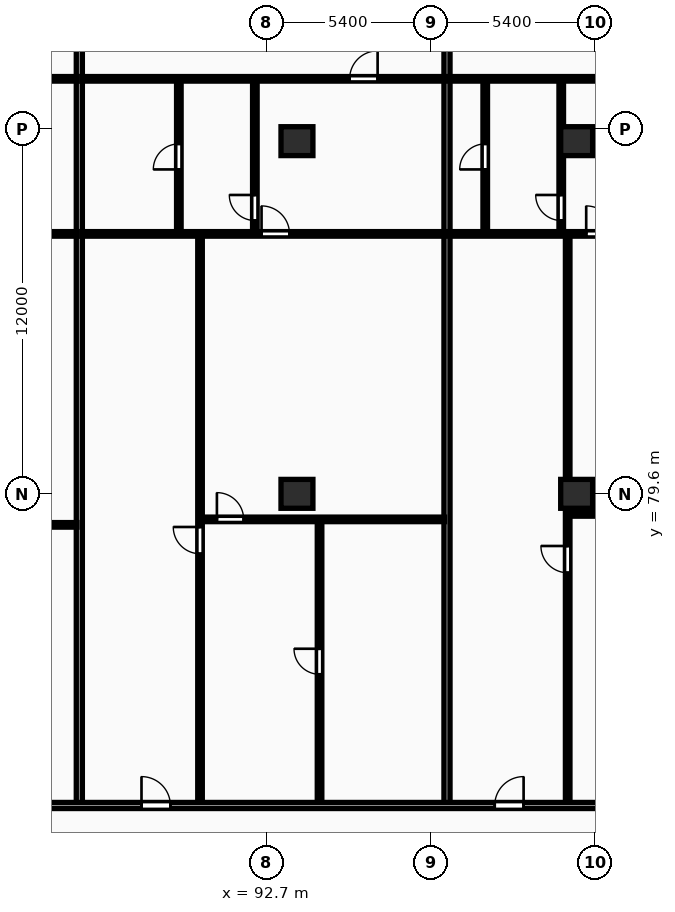
"""IFC4 building model, lengths in metres.
Left out: names, types, materials, properties, quantities, classifications, styles, units other than length and angle.
Written with IfcOpenShell. Run it as: python <this file> out.ifc"""

import sys

from ifc_helpers import new_model, si_unit, direction, frame, frame_2d, origin, origin_2d, place, context, subcontext, project, spatial, rectangle, extrude, element, fill, save


model = new_model("IFC4")
c1 = context("Model", 3, precision=1e-05, world=origin(), true_north=direction((0.0, 1.0)))
c2 = subcontext(c1, "Body", "Model", "MODEL_VIEW")
j1 = project(units=[si_unit("LENGTHUNIT", "METRE"), si_unit("PLANEANGLEUNIT", "RADIAN")], contexts=[c1])
p1 = place(None, origin())
s1 = spatial("IfcSite", under=j1, at=p1, CompositionType="ELEMENT")
p2 = place(p1, origin())
s2 = spatial("IfcBuilding", under=s1, at=p2, CompositionType="ELEMENT")
p3 = place(p2, frame((0.0, 0.0, 24.0)))
s3 = spatial("IfcBuildingStorey", under=s2, at=p3, CompositionType="ELEMENT", Elevation=24.0)
for number, where, z_axis, x_axis in (
    (1, (93.7, 79.6, 0.0), (0.0, 0.0, 1.0), (1.0, 0.0, 0.0)),
    (2, (93.7, 91.2, 0.0), (0.0, 0.0, 1.0), (1.0, 0.0, 0.0)),
    (3, (102.9, 79.6, 0.0), (0.0, 0.0, 1.0), (1.0, 0.0, 0.0)),
    (4, (102.9, 91.2, 0.0), (0.0, 0.0, 1.0), (1.0, 0.0, 0.0)),
):
    element("IfcColumn", number, at=place(p3, frame(where, z_axis=z_axis, x_axis=x_axis)), inside=s3, PredefinedType="COLUMN", context=c2, shape_type="SweptSolid", body=[
        extrude(rectangle(XDim=1.05, YDim=0.95, at=origin_2d()), origin(), (0.0, 0.0, 1.0), 3.25),
    ])
p4 = place(p3, frame((86.542, 69.43, 0.0), z_axis=(0.0, 0.0, 1.0), x_axis=(0.0, 1.0, 0.0)))
e5 = element("IfcWall", 5, at=p4, inside=s3, PredefinedType="PARTITIONING", context=c2, shape_type="SweptSolid", body=[
    extrude(rectangle(XDim=29.07, YDim=0.2, at=frame_2d((14.535, 0.0))), origin(), (0.0, 0.0, 1.0), 2.97),
])
p5 = place(p3, frame((80.494, 78.58, 0.0), z_axis=(0.0, 0.0, 1.0), x_axis=(1.0, 0.0, 0.0)))
e6 = element("IfcWall", 6, at=p5, inside=s3, PredefinedType="PARTITIONING", context=c2, shape_type="SweptSolid", body=[
    extrude(rectangle(XDim=5.968, YDim=0.15, at=frame_2d((2.984, 0.0))), origin(), (0.0, 0.0, 1.0), 2.97),
])
p6 = place(p5, frame((1.403, 0.0, 0.0)))
e7 = element("IfcOpeningElement", 7, at=p6, cuts=e6, PredefinedType="OPENING", context=c2, shape_type="SweptSolid", body=[
    extrude(rectangle(XDim=0.88, YDim=2.06, at=frame_2d((0.44, 1.03))), frame((0.0, 0.085, 0.0), z_axis=(0.0, -1.0, 0.0), x_axis=(1.0, 0.0, 0.0)), (0.0, 0.0, 1.0), 0.17),
])
p7 = place(p3, frame((76.544, 88.15, 0.0), z_axis=(0.0, 0.0, 1.0), x_axis=(1.0, 0.0, 0.0)))
e8 = element("IfcWall", 8, at=p7, inside=s3, PredefinedType="PARTITIONING", context=c2, shape_type="SweptSolid", body=[
    extrude(rectangle(XDim=9.918, YDim=0.15, at=frame_2d((4.959, 0.0))), origin(), (0.0, 0.0, 1.0), 2.97),
])
p8 = place(p7, frame((4.499, 0.0, 0.0)))
e9 = element("IfcOpeningElement", 9, at=p8, cuts=e8, PredefinedType="OPENING", context=c2, shape_type="SweptSolid", body=[
    extrude(rectangle(XDim=0.92, YDim=2.08, at=frame_2d((0.46, 1.04))), frame((0.0, 0.085, 0.0), z_axis=(0.0, -1.0, 0.0), x_axis=(1.0, 0.0, 0.0)), (0.0, 0.0, 1.0), 0.17),
])
p9 = place(p3, frame((76.544, 93.25, 0.0), z_axis=(0.0, 0.0, 1.0), x_axis=(1.0, 0.0, 0.0)))
e10 = element("IfcWall", 10, at=p9, inside=s3, PredefinedType="PARTITIONING", context=c2, shape_type="SweptSolid", body=[
    extrude(rectangle(XDim=9.918, YDim=0.15, at=frame_2d((4.959, 0.0))), origin(), (0.0, 0.0, 1.0), 2.97),
])
p10 = place(p9, frame((4.499, 0.0, 0.0)))
e11 = element("IfcOpeningElement", 11, at=p10, cuts=e10, PredefinedType="OPENING", context=c2, shape_type="SweptSolid", body=[
    extrude(rectangle(XDim=0.92, YDim=2.08, at=frame_2d((0.46, 1.04))), frame((0.0, 0.085, 0.0), z_axis=(0.0, -1.0, 0.0), x_axis=(1.0, 0.0, 0.0)), (0.0, 0.0, 1.0), 0.17),
])
p11 = place(p3, frame((98.635, 69.43, 0.0), z_axis=(0.0, 0.0, 1.0), x_axis=(0.0, 1.0, 0.0)))
e12 = element("IfcWall", 12, at=p11, inside=s3, PredefinedType="PARTITIONING", context=c2, shape_type="SweptSolid", body=[
    extrude(rectangle(XDim=29.07, YDim=0.2, at=frame_2d((14.535, 0.0))), origin(), (0.0, 0.0, 1.0), 2.97),
])
p12 = place(p3, frame((94.443, 69.41, 0.0), z_axis=(0.0, 0.0, 1.0), x_axis=(0.0, 1.0, 0.0)))
e13 = element("IfcWall", 13, at=p12, inside=s3, PredefinedType="PARTITIONING", context=c2, shape_type="SweptSolid", body=[
    extrude(rectangle(XDim=9.35, YDim=0.15, at=frame_2d((4.675, 0.0))), origin(), (0.0, 0.0, 1.0), 2.97),
])
p13 = place(p12, frame((4.255, 0.0, 0.0)))
e14 = element("IfcOpeningElement", 14, at=p13, cuts=e13, PredefinedType="OPENING", context=c2, shape_type="SweptSolid", body=[
    extrude(rectangle(XDim=0.84, YDim=2.04, at=frame_2d((0.42, 1.02))), frame((0.0, 0.085, 0.0), z_axis=(0.0, -1.0, 0.0), x_axis=(1.0, 0.0, 0.0)), (0.0, 0.0, 1.0), 0.17),
])
p14 = place(p3, frame((90.572, 78.76, 0.0), z_axis=(0.0, 0.0, 1.0), x_axis=(1.0, 0.0, 0.0)))
e15 = element("IfcWall", 15, at=p14, inside=s3, PredefinedType="PARTITIONING", context=c2, shape_type="SweptSolid", body=[
    extrude(rectangle(XDim=7.983, YDim=0.15, at=frame_2d((3.992, 0.0))), origin(), (0.0, 0.0, 1.0), 2.97),
])
p15 = place(p14, frame((0.495, 0.0, 0.0)))
e16 = element("IfcOpeningElement", 16, at=p15, cuts=e15, PredefinedType="OPENING", context=c2, shape_type="SweptSolid", body=[
    extrude(rectangle(XDim=0.88, YDim=2.06, at=frame_2d((0.44, 1.03))), frame((0.0, 0.085, 0.0), z_axis=(0.0, -1.0, 0.0), x_axis=(1.0, 0.0, 0.0)), (0.0, 0.0, 1.0), 0.17),
])
p16 = place(p3, frame((90.511, 69.41, 0.0), z_axis=(0.0, 0.0, 1.0), x_axis=(0.0, 1.0, 0.0)))
e17 = element("IfcWall", 17, at=p16, inside=s3, PredefinedType="PARTITIONING", context=c2, shape_type="SweptSolid", body=[
    extrude(rectangle(XDim=18.7, YDim=0.15, at=frame_2d((9.35, 0.0))), origin(), (0.0, 0.0, 1.0), 2.97),
])
p17 = place(p16, frame((8.22, 0.0, 0.0)))
e18 = element("IfcOpeningElement", 18, at=p17, cuts=e17, PredefinedType="OPENING", context=c2, shape_type="SweptSolid", body=[
    extrude(rectangle(XDim=0.88, YDim=2.06, at=frame_2d((0.44, 1.03))), frame((0.0, 0.085, 0.0), z_axis=(0.0, -1.0, 0.0), x_axis=(1.0, 0.0, 0.0)), (0.0, 0.0, 1.0), 0.17),
])
p18 = place(p3, frame((89.815, 88.19, 0.0), z_axis=(0.0, 0.0, 1.0), x_axis=(0.0, 1.0, 0.0)))
e19 = element("IfcWall", 19, at=p18, inside=s3, PredefinedType="PARTITIONING", context=c2, shape_type="SweptSolid", body=[
    extrude(rectangle(XDim=5.0, YDim=0.15, at=frame_2d((2.5, 0.0))), origin(), (0.0, 0.0, 1.0), 2.97),
])
p19 = place(p18, frame((2.08, 0.0, 0.0)))
e20 = element("IfcOpeningElement", 20, at=p19, cuts=e19, PredefinedType="OPENING", context=c2, shape_type="SweptSolid", body=[
    extrude(rectangle(XDim=0.84, YDim=2.04, at=frame_2d((0.42, 1.02))), frame((0.0, 0.085, 0.0), z_axis=(0.0, -1.0, 0.0), x_axis=(1.0, 0.0, 0.0)), (0.0, 0.0, 1.0), 0.17),
])
p20 = place(p3, frame((92.315, 88.19, 0.0), z_axis=(0.0, 0.0, 1.0), x_axis=(0.0, 1.0, 0.0)))
e21 = element("IfcWall", 21, at=p20, inside=s3, PredefinedType="PARTITIONING", context=c2, shape_type="SweptSolid", body=[
    extrude(rectangle(XDim=5.0, YDim=0.15, at=frame_2d((2.5, 0.0))), origin(), (0.0, 0.0, 1.0), 2.97),
])
p21 = place(p20, frame((0.4, 0.0, 0.0)))
e22 = element("IfcOpeningElement", 22, at=p21, cuts=e21, PredefinedType="OPENING", context=c2, shape_type="SweptSolid", body=[
    extrude(rectangle(XDim=0.84, YDim=2.04, at=frame_2d((0.42, 1.02))), frame((0.0, 0.085, 0.0), z_axis=(0.0, -1.0, 0.0), x_axis=(1.0, 0.0, 0.0)), (0.0, 0.0, 1.0), 0.17),
])
p22 = place(p3, frame((86.622, 88.15, 0.0), z_axis=(0.0, 0.0, 1.0), x_axis=(1.0, 0.0, 0.0)))
e23 = element("IfcWall", 23, at=p22, inside=s3, PredefinedType="PARTITIONING", context=c2, shape_type="SweptSolid", body=[
    extrude(rectangle(XDim=11.933, YDim=0.15, at=frame_2d((5.967, 0.0))), origin(), (0.0, 0.0, 1.0), 2.97),
])
p23 = place(p22, frame((5.914, 0.0, 0.0)))
e24 = element("IfcOpeningElement", 24, at=p23, cuts=e23, PredefinedType="OPENING", context=c2, shape_type="SweptSolid", body=[
    extrude(rectangle(XDim=0.92, YDim=2.08, at=frame_2d((0.46, 1.04))), frame((0.0, 0.085, 0.0), z_axis=(0.0, -1.0, 0.0), x_axis=(1.0, 0.0, 0.0)), (0.0, 0.0, 1.0), 0.17),
])
p24 = place(p3, frame((86.622, 93.25, 0.0), z_axis=(0.0, 0.0, 1.0), x_axis=(1.0, 0.0, 0.0)))
e25 = element("IfcWall", 25, at=p24, inside=s3, PredefinedType="PARTITIONING", context=c2, shape_type="SweptSolid", body=[
    extrude(rectangle(XDim=11.933, YDim=0.15, at=frame_2d((5.967, 0.0))), origin(), (0.0, 0.0, 1.0), 2.97),
])
p25 = place(p24, frame((8.812, 0.0, 0.0)))
e26 = element("IfcOpeningElement", 26, at=p25, cuts=e25, PredefinedType="OPENING", context=c2, shape_type="SweptSolid", body=[
    extrude(rectangle(XDim=0.92, YDim=2.08, at=frame_2d((0.46, 1.04))), frame((0.0, 0.085, 0.0), z_axis=(0.0, -1.0, 0.0), x_axis=(1.0, 0.0, 0.0)), (0.0, 0.0, 1.0), 0.17),
])
p26 = place(p3, frame((102.665, 78.94, 0.0), z_axis=(0.0, 0.0, 1.0), x_axis=(1.0, 0.0, 0.0)))
e27 = element("IfcWall", 27, at=p26, inside=s3, PredefinedType="PARTITIONING", context=c2, shape_type="SweptSolid", body=[
    extrude(rectangle(XDim=5.968, YDim=0.15, at=frame_2d((2.984, 0.0))), origin(), (0.0, 0.0, 1.0), 2.97),
])
p27 = place(p26, frame((2.544, 0.0, 0.0)))
e28 = element("IfcOpeningElement", 28, at=p27, cuts=e27, PredefinedType="OPENING", context=c2, shape_type="SweptSolid", body=[
    extrude(rectangle(XDim=0.88, YDim=2.06, at=frame_2d((0.44, 1.03))), frame((0.0, 0.085, 0.0), z_axis=(0.0, -1.0, 0.0), x_axis=(1.0, 0.0, 0.0)), (0.0, 0.0, 1.0), 0.17),
])
p28 = place(p3, frame((102.605, 69.41, 0.0), z_axis=(0.0, 0.0, 1.0), x_axis=(0.0, 1.0, 0.0)))
e29 = element("IfcWall", 29, at=p28, inside=s3, PredefinedType="PARTITIONING", context=c2, shape_type="SweptSolid", body=[
    extrude(rectangle(XDim=18.7, YDim=0.15, at=frame_2d((9.35, 0.0))), origin(), (0.0, 0.0, 1.0), 2.22),
])
p29 = place(p28, frame((7.595, 0.0, 0.0)))
e30 = element("IfcOpeningElement", 30, at=p29, cuts=e29, PredefinedType="OPENING", context=c2, shape_type="SweptSolid", body=[
    extrude(rectangle(XDim=0.88, YDim=2.06, at=frame_2d((0.44, 1.03))), frame((0.0, 0.085, 0.0), z_axis=(0.0, -1.0, 0.0), x_axis=(1.0, 0.0, 0.0)), (0.0, 0.0, 1.0), 0.17),
])
p30 = place(p3, frame((99.893, 88.19, 0.0), z_axis=(0.0, 0.0, 1.0), x_axis=(0.0, 1.0, 0.0)))
e31 = element("IfcWall", 31, at=p30, inside=s3, PredefinedType="PARTITIONING", context=c2, shape_type="SweptSolid", body=[
    extrude(rectangle(XDim=5.0, YDim=0.15, at=frame_2d((2.5, 0.0))), origin(), (0.0, 0.0, 1.0), 2.97),
])
p31 = place(p30, frame((2.08, 0.0, 0.0)))
e32 = element("IfcOpeningElement", 32, at=p31, cuts=e31, PredefinedType="OPENING", context=c2, shape_type="SweptSolid", body=[
    extrude(rectangle(XDim=0.84, YDim=2.04, at=frame_2d((0.42, 1.02))), frame((0.0, 0.085, 0.0), z_axis=(0.0, -1.0, 0.0), x_axis=(1.0, 0.0, 0.0)), (0.0, 0.0, 1.0), 0.17),
])
p32 = place(p3, frame((102.393, 88.19, 0.0), z_axis=(0.0, 0.0, 1.0), x_axis=(0.0, 1.0, 0.0)))
e33 = element("IfcWall", 33, at=p32, inside=s3, PredefinedType="PARTITIONING", context=c2, shape_type="SweptSolid", body=[
    extrude(rectangle(XDim=5.0, YDim=0.15, at=frame_2d((2.5, 0.0))), origin(), (0.0, 0.0, 1.0), 2.97),
])
p33 = place(p32, frame((0.4, 0.0, 0.0)))
e34 = element("IfcOpeningElement", 34, at=p33, cuts=e33, PredefinedType="OPENING", context=c2, shape_type="SweptSolid", body=[
    extrude(rectangle(XDim=0.84, YDim=2.04, at=frame_2d((0.42, 1.02))), frame((0.0, 0.085, 0.0), z_axis=(0.0, -1.0, 0.0), x_axis=(1.0, 0.0, 0.0)), (0.0, 0.0, 1.0), 0.17),
])
p34 = place(p3, frame((98.715, 88.15, 0.0), z_axis=(0.0, 0.0, 1.0), x_axis=(1.0, 0.0, 0.0)))
e35 = element("IfcWall", 35, at=p34, inside=s3, PredefinedType="PARTITIONING", context=c2, shape_type="SweptSolid", body=[
    extrude(rectangle(XDim=9.918, YDim=0.15, at=frame_2d((4.959, 0.0))), origin(), (0.0, 0.0, 1.0), 2.97),
])
p35 = place(p34, frame((4.499, 0.0, 0.0)))
e36 = element("IfcOpeningElement", 36, at=p35, cuts=e35, PredefinedType="OPENING", context=c2, shape_type="SweptSolid", body=[
    extrude(rectangle(XDim=0.92, YDim=2.08, at=frame_2d((0.46, 1.04))), frame((0.0, 0.085, 0.0), z_axis=(0.0, -1.0, 0.0), x_axis=(1.0, 0.0, 0.0)), (0.0, 0.0, 1.0), 0.17),
])
p36 = place(p3, frame((98.715, 93.25, 0.0), z_axis=(0.0, 0.0, 1.0), x_axis=(1.0, 0.0, 0.0)))
e37 = element("IfcWall", 37, at=p36, inside=s3, PredefinedType="PARTITIONING", context=c2, shape_type="SweptSolid", body=[
    extrude(rectangle(XDim=9.918, YDim=0.15, at=frame_2d((4.959, 0.0))), origin(), (0.0, 0.0, 1.0), 2.97),
])
p37 = place(p36, frame((5.936, 0.0, 0.0)))
e38 = element("IfcOpeningElement", 38, at=p37, cuts=e37, PredefinedType="OPENING", context=c2, shape_type="SweptSolid", body=[
    extrude(rectangle(XDim=0.92, YDim=2.08, at=frame_2d((0.46, 1.04))), frame((0.0, 0.085, 0.0), z_axis=(0.0, -1.0, 0.0), x_axis=(1.0, 0.0, 0.0)), (0.0, 0.0, 1.0), 0.17),
])
p38 = place(p3, frame((55.3, 69.35, 0.0), z_axis=(0.0, 0.0, 1.0), x_axis=(1.0, 0.0, 0.0)))
e39 = element("IfcWall", 39, at=p38, inside=s3, PredefinedType="PARTITIONING", context=c2, shape_type="SweptSolid", body=[
    extrude(rectangle(XDim=77.6, YDim=0.2, at=frame_2d((38.8, 0.0))), origin(), (0.0, 0.0, 1.0), 2.97),
])
p39 = place(p38, frame((1.81, 0.0, 0.0)))
e40 = element("IfcOpeningElement", 40, at=p39, cuts=e39, PredefinedType="OPENING", context=c2, shape_type="SweptSolid", body=[
    extrude(rectangle(XDim=0.95, YDim=2.15, at=frame_2d((0.475, 1.075))), frame((0.0, 0.11, 0.0), z_axis=(0.0, -1.0, 0.0), x_axis=(1.0, 0.0, 0.0)), (0.0, 0.0, 1.0), 0.22),
])
p40 = place(p38, frame((10.448, 0.0, 0.0)))
e41 = element("IfcOpeningElement", 41, at=p40, cuts=e39, PredefinedType="OPENING", context=c2, shape_type="SweptSolid", body=[
    extrude(rectangle(XDim=0.95, YDim=2.15, at=frame_2d((0.475, 1.075))), frame((0.0, 0.11, 0.0), z_axis=(0.0, -1.0, 0.0), x_axis=(1.0, 0.0, 0.0)), (0.0, 0.0, 1.0), 0.22),
])
p41 = place(p38, frame((23.208, 0.0, 0.0)))
e42 = element("IfcOpeningElement", 42, at=p41, cuts=e39, PredefinedType="OPENING", context=c2, shape_type="SweptSolid", body=[
    extrude(rectangle(XDim=0.95, YDim=2.15, at=frame_2d((0.475, 1.075))), frame((0.0, 0.11, 0.0), z_axis=(0.0, -1.0, 0.0), x_axis=(1.0, 0.0, 0.0)), (0.0, 0.0, 1.0), 0.22),
])
p42 = place(p38, frame((33.287, 0.0, 0.0)))
e43 = element("IfcOpeningElement", 43, at=p42, cuts=e39, PredefinedType="OPENING", context=c2, shape_type="SweptSolid", body=[
    extrude(rectangle(XDim=0.95, YDim=2.15, at=frame_2d((0.475, 1.075))), frame((0.0, 0.11, 0.0), z_axis=(0.0, -1.0, 0.0), x_axis=(1.0, 0.0, 0.0)), (0.0, 0.0, 1.0), 0.22),
])
p43 = place(p38, frame((44.905, 0.0, 0.0)))
e44 = element("IfcOpeningElement", 44, at=p43, cuts=e39, PredefinedType="OPENING", context=c2, shape_type="SweptSolid", body=[
    extrude(rectangle(XDim=0.95, YDim=2.15, at=frame_2d((0.475, 1.075))), frame((0.0, 0.11, 0.0), z_axis=(0.0, -1.0, 0.0), x_axis=(1.0, 0.0, 0.0)), (0.0, 0.0, 1.0), 0.22),
])
p44 = place(p38, frame((54.119, 0.0, 0.0)))
e45 = element("IfcOpeningElement", 45, at=p44, cuts=e39, PredefinedType="OPENING", context=c2, shape_type="SweptSolid", body=[
    extrude(rectangle(XDim=0.95, YDim=2.15, at=frame_2d((0.475, 1.075))), frame((0.0, 0.11, 0.0), z_axis=(0.0, -1.0, 0.0), x_axis=(1.0, 0.0, 0.0)), (0.0, 0.0, 1.0), 0.22),
])
p45 = place(p38, frame((66.74, 0.0, 0.0)))
e46 = element("IfcOpeningElement", 46, at=p45, cuts=e39, PredefinedType="OPENING", context=c2, shape_type="SweptSolid", body=[
    extrude(rectangle(XDim=0.95, YDim=2.15, at=frame_2d((0.475, 1.075))), frame((0.0, 0.11, 0.0), z_axis=(0.0, -1.0, 0.0), x_axis=(1.0, 0.0, 0.0)), (0.0, 0.0, 1.0), 0.22),
])
p46 = place(p13, origin())
e47 = element("IfcDoor", 47, at=p46, inside=s3, OperationType="SINGLE_SWING_RIGHT", PredefinedType="DOOR", context=c2, shape_type="SweptSolid", body=[
    extrude(rectangle(XDim=0.84, YDim=2.04, at=frame_2d((0.42, 1.02))), frame((0.0, 0.025, 0.0), z_axis=(0.0, -1.0, 0.0), x_axis=(1.0, 0.0, 0.0)), (0.0, 0.0, 1.0), 0.05),
])
fill(e14, e47)
p47 = place(p15, origin())
e48 = element("IfcDoor", 48, at=p47, inside=s3, OperationType="SINGLE_SWING_LEFT", PredefinedType="DOOR", context=c2, shape_type="SweptSolid", body=[
    extrude(rectangle(XDim=0.88, YDim=2.06, at=frame_2d((0.44, 1.03))), frame((0.0, 0.025, 0.0), z_axis=(0.0, -1.0, 0.0), x_axis=(1.0, 0.0, 0.0)), (0.0, 0.0, 1.0), 0.05),
])
fill(e16, e48)
p48 = place(p17, origin())
e49 = element("IfcDoor", 49, at=p48, inside=s3, OperationType="SINGLE_SWING_RIGHT", PredefinedType="DOOR", context=c2, shape_type="SweptSolid", body=[
    extrude(rectangle(XDim=0.88, YDim=2.06, at=frame_2d((0.44, 1.03))), frame((0.0, 0.025, 0.0), z_axis=(0.0, -1.0, 0.0), x_axis=(1.0, 0.0, 0.0)), (0.0, 0.0, 1.0), 0.05),
])
fill(e18, e49)
p49 = place(p19, origin())
e50 = element("IfcDoor", 50, at=p49, inside=s3, OperationType="SINGLE_SWING_LEFT", PredefinedType="DOOR", context=c2, shape_type="SweptSolid", body=[
    extrude(rectangle(XDim=0.84, YDim=2.04, at=frame_2d((0.42, 1.02))), frame((0.0, 0.025, 0.0), z_axis=(0.0, -1.0, 0.0), x_axis=(1.0, 0.0, 0.0)), (0.0, 0.0, 1.0), 0.05),
])
fill(e20, e50)
p50 = place(p21, origin())
e51 = element("IfcDoor", 51, at=p50, inside=s3, OperationType="SINGLE_SWING_RIGHT", PredefinedType="DOOR", context=c2, shape_type="SweptSolid", body=[
    extrude(rectangle(XDim=0.84, YDim=2.04, at=frame_2d((0.42, 1.02))), frame((0.0, 0.025, 0.0), z_axis=(0.0, -1.0, 0.0), x_axis=(1.0, 0.0, 0.0)), (0.0, 0.0, 1.0), 0.05),
])
fill(e22, e51)
p51 = place(p23, origin())
e52 = element("IfcDoor", 52, at=p51, inside=s3, OperationType="SINGLE_SWING_LEFT", PredefinedType="DOOR", context=c2, shape_type="SweptSolid", body=[
    extrude(rectangle(XDim=0.92, YDim=2.08, at=frame_2d((0.46, 1.04))), frame((0.0, 0.025, 0.0), z_axis=(0.0, -1.0, 0.0), x_axis=(1.0, 0.0, 0.0)), (0.0, 0.0, 1.0), 0.05),
])
fill(e24, e52)
p52 = place(p25, origin())
e53 = element("IfcDoor", 53, at=p52, inside=s3, OperationType="SINGLE_SWING_RIGHT", PredefinedType="DOOR", context=c2, shape_type="SweptSolid", body=[
    extrude(rectangle(XDim=0.92, YDim=2.08, at=frame_2d((0.46, 1.04))), frame((0.0, 0.025, 0.0), z_axis=(0.0, -1.0, 0.0), x_axis=(1.0, 0.0, 0.0)), (0.0, 0.0, 1.0), 0.05),
])
fill(e26, e53)
p53 = place(p29, origin())
e54 = element("IfcDoor", 54, at=p53, inside=s3, OperationType="SINGLE_SWING_RIGHT", PredefinedType="DOOR", context=c2, shape_type="SweptSolid", body=[
    extrude(rectangle(XDim=0.88, YDim=2.06, at=frame_2d((0.44, 1.03))), frame((0.0, 0.025, 0.0), z_axis=(0.0, -1.0, 0.0), x_axis=(1.0, 0.0, 0.0)), (0.0, 0.0, 1.0), 0.05),
])
fill(e30, e54)
p54 = place(p31, origin())
e55 = element("IfcDoor", 55, at=p54, inside=s3, OperationType="SINGLE_SWING_LEFT", PredefinedType="DOOR", context=c2, shape_type="SweptSolid", body=[
    extrude(rectangle(XDim=0.84, YDim=2.04, at=frame_2d((0.42, 1.02))), frame((0.0, 0.025, 0.0), z_axis=(0.0, -1.0, 0.0), x_axis=(1.0, 0.0, 0.0)), (0.0, 0.0, 1.0), 0.05),
])
fill(e32, e55)
p55 = place(p33, origin())
e56 = element("IfcDoor", 56, at=p55, inside=s3, OperationType="SINGLE_SWING_RIGHT", PredefinedType="DOOR", context=c2, shape_type="SweptSolid", body=[
    extrude(rectangle(XDim=0.84, YDim=2.04, at=frame_2d((0.42, 1.02))), frame((0.0, 0.025, 0.0), z_axis=(0.0, -1.0, 0.0), x_axis=(1.0, 0.0, 0.0)), (0.0, 0.0, 1.0), 0.05),
])
fill(e34, e56)
p56 = place(p35, origin())
e57 = element("IfcDoor", 57, at=p56, inside=s3, OperationType="SINGLE_SWING_LEFT", PredefinedType="DOOR", context=c2, shape_type="SweptSolid", body=[
    extrude(rectangle(XDim=0.92, YDim=2.08, at=frame_2d((0.46, 1.04))), frame((0.0, 0.025, 0.0), z_axis=(0.0, -1.0, 0.0), x_axis=(1.0, 0.0, 0.0)), (0.0, 0.0, 1.0), 0.05),
])
fill(e36, e57)
p57 = place(p42, origin())
e58 = element("IfcDoor", 58, at=p57, inside=s3, OperationType="SINGLE_SWING_LEFT", PredefinedType="DOOR", context=c2, shape_type="SweptSolid", body=[
    extrude(rectangle(XDim=0.95, YDim=2.15, at=frame_2d((0.475, 1.075))), frame((0.0, 0.025, 0.0), z_axis=(0.0, -1.0, 0.0), x_axis=(1.0, 0.0, 0.0)), (0.0, 0.0, 1.0), 0.05),
])
fill(e43, e58)
p58 = place(p43, origin())
e59 = element("IfcDoor", 59, at=p58, inside=s3, OperationType="SINGLE_SWING_RIGHT", PredefinedType="DOOR", context=c2, shape_type="SweptSolid", body=[
    extrude(rectangle(XDim=0.95, YDim=2.15, at=frame_2d((0.475, 1.075))), frame((0.0, 0.025, 0.0), z_axis=(0.0, -1.0, 0.0), x_axis=(1.0, 0.0, 0.0)), (0.0, 0.0, 1.0), 0.05),
])
fill(e44, e59)
save(model, sys.argv[1])
